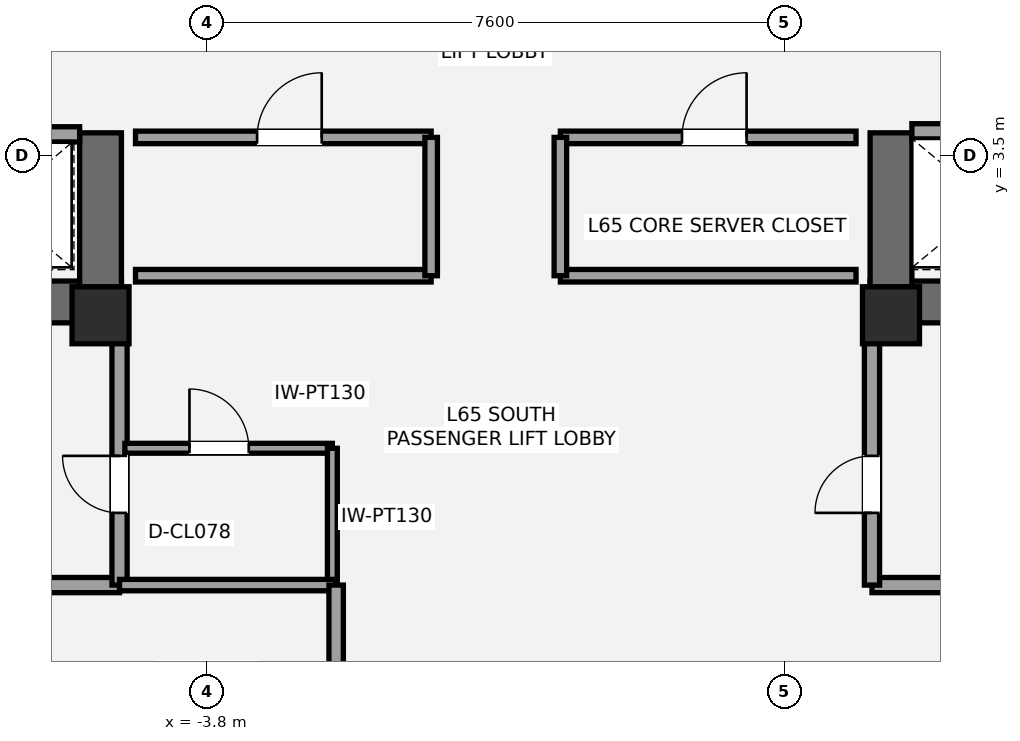
"""IFC4 building model, lengths in metres.
Left out: names, types, materials, properties, quantities, classifications, styles, units other than length and angle.
Written with IfcOpenShell. Run it as: python <this file> out.ifc"""

import sys

from ifc_helpers import new_model, si_unit, direction, frame, frame_2d, origin, origin_2d, place, context, subcontext, project, spatial, rectangle, extrude, element, fill, save


model = new_model("IFC4")
c1 = context("Model", 3, precision=1e-05, world=origin(), true_north=direction((0.0, 1.0)))
c2 = subcontext(c1, "Body", "Model", "MODEL_VIEW")
j1 = project(units=[si_unit("LENGTHUNIT", "METRE"), si_unit("PLANEANGLEUNIT", "RADIAN")], contexts=[c1])
p1 = place(None, origin())
s1 = spatial("IfcSite", under=j1, at=p1, CompositionType="ELEMENT")
p2 = place(p1, origin())
s2 = spatial("IfcBuilding", under=s1, at=p2, CompositionType="ELEMENT")
p3 = place(p2, frame((0.0, 0.0, 232.05)))
s3 = spatial("IfcBuildingStorey", under=s2, at=p3, CompositionType="ELEMENT", Elevation=232.05)
p4 = place(p3, frame((-4.925, 1.575, 0.0), z_axis=(0.0, 0.0, 1.0), x_axis=(-1.0, 0.0, 0.0)))
e1 = element("IfcWall", 1, at=p4, inside=s3, PredefinedType="SHEAR", context=c2, shape_type="SweptSolid", body=[
    extrude(rectangle(XDim=8.775, YDim=0.55, at=frame_2d((4.387, 0.0))), origin(), (0.0, 0.0, 1.0), 3.15),
])
p5 = place(p4, frame((5.375, 0.0, 0.0)))
e2 = element("IfcOpeningElement", 2, at=p5, cuts=e1, PredefinedType="OPENING", context=c2, shape_type="SweptSolid", body=[
    extrude(rectangle(XDim=1.05, YDim=2.15, at=frame_2d((0.525, 1.075))), frame((0.0, 0.285, 0.0), z_axis=(0.0, -1.0, 0.0), x_axis=(1.0, 0.0, 0.0)), (0.0, 0.0, 1.0), 0.57),
])
p6 = place(p4, frame((3.705, 0.0, 0.0)))
e3 = element("IfcOpeningElement", 3, at=p6, cuts=e1, PredefinedType="OPENING", context=c2, shape_type="SweptSolid", body=[
    extrude(rectangle(XDim=1.1, YDim=2.2, at=frame_2d((0.55, 1.1))), frame((0.0, 0.285, 0.0), z_axis=(0.0, -1.0, 0.0), x_axis=(1.0, 0.0, 0.0)), (0.0, 0.0, 1.0), 0.57),
])
p7 = place(p3, frame((-5.2, 1.3, 0.0), z_axis=(0.0, 0.0, 1.0), x_axis=(0.0, 1.0, 0.0)))
e4 = element("IfcWall", 4, at=p7, inside=s3, PredefinedType="SHEAR", context=c2, shape_type="SweptSolid", body=[
    extrude(rectangle(XDim=2.5, YDim=0.55, at=frame_2d((1.25, 0.0))), origin(), (0.0, 0.0, 1.0), 3.15),
])
p8 = place(p3, frame((13.7, 1.575, 0.0), z_axis=(0.0, 0.0, 1.0), x_axis=(-1.0, 0.0, 0.0)))
e5 = element("IfcWall", 5, at=p8, inside=s3, PredefinedType="SHEAR", context=c2, shape_type="SweptSolid", body=[
    extrude(rectangle(XDim=8.775, YDim=0.55, at=frame_2d((4.387, 0.0))), origin(), (0.0, 0.0, 1.0), 3.15),
])
p9 = place(p8, frame((2.35, 0.0, 0.0)))
e6 = element("IfcOpeningElement", 6, at=p9, cuts=e5, PredefinedType="OPENING", context=c2, shape_type="SweptSolid", body=[
    extrude(rectangle(XDim=1.05, YDim=2.15, at=frame_2d((0.525, 1.075))), frame((0.0, 0.285, 0.0), z_axis=(0.0, -1.0, 0.0), x_axis=(1.0, 0.0, 0.0)), (0.0, 0.0, 1.0), 0.57),
])
p10 = place(p8, frame((4.35, 0.0, 0.0)))
e7 = element("IfcOpeningElement", 7, at=p10, cuts=e5, PredefinedType="OPENING", context=c2, shape_type="SweptSolid", body=[
    extrude(rectangle(XDim=1.1, YDim=2.2, at=frame_2d((0.55, 1.1))), frame((0.0, 0.285, 0.0), z_axis=(0.0, -1.0, 0.0), x_axis=(1.0, 0.0, 0.0)), (0.0, 0.0, 1.0), 0.57),
])
p11 = place(p3, frame((5.2, 1.3, 0.0), z_axis=(0.0, 0.0, 1.0), x_axis=(0.0, 1.0, 0.0)))
e8 = element("IfcWall", 8, at=p11, inside=s3, PredefinedType="SHEAR", context=c2, shape_type="SweptSolid", body=[
    extrude(rectangle(XDim=2.5, YDim=0.55, at=frame_2d((1.25, 0.0))), origin(), (0.0, 0.0, 1.0), 3.15),
])
for number, where, z_axis, x_axis in (
    (9, (-5.2, 1.4, 0.0), (0.0, 0.0, 1.0), (1.0, 0.0, 0.0)),
    (10, (5.2, 1.4, 0.0), (0.0, 0.0, 1.0), (1.0, 0.0, 0.0)),
):
    element("IfcColumn", number, at=place(p3, frame(where, z_axis=z_axis, x_axis=x_axis)), inside=s3, PredefinedType="PILASTER", context=c2, shape_type="SweptSolid", body=[
        extrude(rectangle(XDim=0.75, YDim=0.75, at=origin_2d()), origin(), (0.0, 0.0, 1.0), 3.15),
    ])
p12 = place(p3, frame((-7.2, -2.15, 0.0), z_axis=(0.0, 0.0, 1.0), x_axis=(1.0, 0.0, 0.0)))
e11 = element("IfcWall", 11, at=p12, inside=s3, PredefinedType="SOLIDWALL", context=c2, shape_type="SweptSolid", body=[
    extrude(rectangle(XDim=2.25, YDim=0.2, at=frame_2d((1.125, 0.0))), origin(), (0.0, 0.0, 1.0), 2.97),
])
p13 = place(p3, frame((-4.95, -2.15, 0.0), z_axis=(0.0, 0.0, 1.0), x_axis=(0.0, 1.0, 0.0)))
e12 = element("IfcWall", 12, at=p13, inside=s3, PredefinedType="SOLIDWALL", context=c2, shape_type="SweptSolid", body=[
    extrude(rectangle(XDim=3.5, YDim=0.2, at=frame_2d((1.75, 0.0))), origin(), (0.0, 0.0, 1.0), 2.423),
])
p14 = place(p13, frame((0.95, 0.0, 0.0)))
e13 = element("IfcOpeningElement", 13, at=p14, cuts=e12, PredefinedType="OPENING", context=c2, shape_type="SweptSolid", body=[
    extrude(rectangle(XDim=0.75, YDim=2.1, at=frame_2d((0.375, 1.05))), frame((0.0, 0.11, 0.0), z_axis=(0.0, -1.0, 0.0), x_axis=(1.0, 0.0, 0.0)), (0.0, 0.0, 1.0), 0.22),
])
p15 = place(p3, frame((4.95, -2.15, 0.0), z_axis=(0.0, 0.0, 1.0), x_axis=(1.0, 0.0, 0.0)))
e14 = element("IfcWall", 14, at=p15, inside=s3, PredefinedType="SOLIDWALL", context=c2, shape_type="SweptSolid", body=[
    extrude(rectangle(XDim=2.25, YDim=0.2, at=frame_2d((1.125, 0.0))), origin(), (0.0, 0.0, 1.0), 2.97),
])
p16 = place(p3, frame((4.95, -2.15, 0.0), z_axis=(0.0, 0.0, 1.0), x_axis=(0.0, 1.0, 0.0)))
e15 = element("IfcWall", 15, at=p16, inside=s3, PredefinedType="SOLIDWALL", context=c2, shape_type="SweptSolid", body=[
    extrude(rectangle(XDim=3.5, YDim=0.2, at=frame_2d((1.75, 0.0))), origin(), (0.0, 0.0, 1.0), 2.423),
])
p17 = place(p16, frame((0.95, 0.0, 0.0)))
e16 = element("IfcOpeningElement", 16, at=p17, cuts=e15, PredefinedType="OPENING", context=c2, shape_type="SweptSolid", body=[
    extrude(rectangle(XDim=0.75, YDim=2.1, at=frame_2d((0.375, 1.05))), frame((0.0, 0.11, 0.0), z_axis=(0.0, -1.0, 0.0), x_axis=(1.0, 0.0, 0.0)), (0.0, 0.0, 1.0), 0.22),
])
p18 = place(p3, frame((-4.88, -0.35, 0.0), z_axis=(0.0, 0.0, 1.0), x_axis=(1.0, 0.0, 0.0)))
e17 = element("IfcWall", 17, at=p18, inside=s3, PredefinedType="PARTITIONING", context=c2, shape_type="SweptSolid", body=[
    extrude(rectangle(XDim=2.73, YDim=0.13, at=frame_2d((1.365, 0.0))), origin(), (0.0, 0.0, 1.0), 2.97),
])
p19 = place(p18, frame((0.85, 0.0, 0.0)))
e18 = element("IfcOpeningElement", 18, at=p19, cuts=e17, PredefinedType="OPENING", context=c2, shape_type="SweptSolid", body=[
    extrude(rectangle(XDim=0.78, YDim=2.1, at=frame_2d((0.39, 1.05))), frame((0.0, 0.075, 0.0), z_axis=(0.0, -1.0, 0.0), x_axis=(1.0, 0.0, 0.0)), (0.0, 0.0, 1.0), 0.15),
])
p20 = place(p3, frame((-2.15, -2.15, 0.0), z_axis=(0.0, 0.0, 1.0), x_axis=(0.0, 1.0, 0.0)))
e19 = element("IfcWall", 19, at=p20, inside=s3, PredefinedType="PARTITIONING", context=c2, shape_type="SweptSolid", body=[
    extrude(rectangle(XDim=1.8, YDim=0.13, at=frame_2d((0.9, 0.0))), origin(), (0.0, 0.0, 1.0), 2.97),
])
p21 = place(p3, frame((-9.78, 3.78, 0.0), z_axis=(0.0, 0.0, 1.0), x_axis=(1.0, 0.0, 0.0)))
e20 = element("IfcWall", 20, at=p21, inside=s3, PredefinedType="SOLIDWALL", context=c2, shape_type="SweptSolid", body=[
    extrude(rectangle(XDim=4.305, YDim=0.2, at=frame_2d((2.152, 0.0))), origin(), (0.0, 0.0, 1.0), 2.97),
])
p22 = place(p21, frame((2.72, 0.0, 0.0)))
e21 = element("IfcOpeningElement", 21, at=p22, cuts=e20, PredefinedType="OPENING", context=c2, shape_type="SweptSolid", body=[
    extrude(rectangle(XDim=1.1, YDim=2.2, at=frame_2d((0.55, 1.1))), frame((0.0, 0.11, 0.0), z_axis=(0.0, -1.0, 0.0), x_axis=(1.0, 0.0, 0.0)), (0.0, 0.0, 1.0), 0.22),
])
p23 = place(p3, frame((5.475, 3.82, 0.0), z_axis=(0.0, 0.0, 1.0), x_axis=(1.0, 0.0, 0.0)))
e22 = element("IfcWall", 22, at=p23, inside=s3, PredefinedType="SOLIDWALL", context=c2, shape_type="SweptSolid", body=[
    extrude(rectangle(XDim=4.305, YDim=0.2, at=frame_2d((2.152, 0.0))), origin(), (0.0, 0.0, 1.0), 2.97),
])
p24 = place(p23, frame((0.65, 0.0, 0.0)))
e23 = element("IfcOpeningElement", 23, at=p24, cuts=e22, PredefinedType="OPENING", context=c2, shape_type="SweptSolid", body=[
    extrude(rectangle(XDim=1.2, YDim=2.2, at=frame_2d((0.6, 1.1))), frame((0.0, 0.11, 0.0), z_axis=(0.0, -1.0, 0.0), x_axis=(1.0, 0.0, 0.0)), (0.0, 0.0, 1.0), 0.22),
])
p25 = place(p3, frame((-4.74, 1.92, 0.0), z_axis=(0.0, 0.0, 1.0), x_axis=(1.0, 0.0, 0.0)))
e24 = element("IfcWall", 24, at=p25, inside=s3, PredefinedType="PARTITIONING", context=c2, shape_type="SweptSolid", body=[
    extrude(rectangle(XDim=3.89, YDim=0.165, at=frame_2d((1.945, 0.0))), origin(), (0.0, 0.0, 1.0), 2.11),
])
p26 = place(p3, frame((-4.74, 3.74, 0.0), z_axis=(0.0, 0.0, 1.0), x_axis=(1.0, 0.0, 0.0)))
e25 = element("IfcWall", 25, at=p26, inside=s3, PredefinedType="PARTITIONING", context=c2, shape_type="SweptSolid", body=[
    extrude(rectangle(XDim=3.89, YDim=0.165, at=frame_2d((1.945, 0.0))), origin(), (0.0, 0.0, 1.0), 2.97),
])
p27 = place(p26, frame((1.6, 0.0, 0.0)))
e26 = element("IfcOpeningElement", 26, at=p27, cuts=e25, PredefinedType="OPENING", context=c2, shape_type="SweptSolid", body=[
    extrude(rectangle(XDim=0.85, YDim=2.1, at=frame_2d((0.425, 1.05))), frame((0.0, 0.093, 0.0), z_axis=(0.0, -1.0, 0.0), x_axis=(1.0, 0.0, 0.0)), (0.0, 0.0, 1.0), 0.185),
])
p28 = place(p3, frame((-0.85, 1.92, 0.0), z_axis=(0.0, 0.0, 1.0), x_axis=(0.0, 1.0, 0.0)))
e27 = element("IfcWall", 27, at=p28, inside=s3, PredefinedType="PARTITIONING", context=c2, shape_type="SweptSolid", body=[
    extrude(rectangle(XDim=1.82, YDim=0.165, at=frame_2d((0.91, 0.0))), origin(), (0.0, 0.0, 1.0), 2.97),
])
p29 = place(p3, frame((0.85, 1.92, 0.0), z_axis=(0.0, 0.0, 1.0), x_axis=(1.0, 0.0, 0.0)))
e28 = element("IfcWall", 28, at=p29, inside=s3, PredefinedType="PARTITIONING", context=c2, shape_type="SweptSolid", body=[
    extrude(rectangle(XDim=3.89, YDim=0.165, at=frame_2d((1.945, 0.0))), origin(), (0.0, 0.0, 1.0), 2.11),
])
p30 = place(p3, frame((0.85, 3.74, 0.0), z_axis=(0.0, 0.0, 1.0), x_axis=(1.0, 0.0, 0.0)))
e29 = element("IfcWall", 29, at=p30, inside=s3, PredefinedType="PARTITIONING", context=c2, shape_type="SweptSolid", body=[
    extrude(rectangle(XDim=3.89, YDim=0.165, at=frame_2d((1.945, 0.0))), origin(), (0.0, 0.0, 1.0), 2.97),
])
p31 = place(p30, frame((1.6, 0.0, 0.0)))
e30 = element("IfcOpeningElement", 30, at=p31, cuts=e29, PredefinedType="OPENING", context=c2, shape_type="SweptSolid", body=[
    extrude(rectangle(XDim=0.85, YDim=2.1, at=frame_2d((0.425, 1.05))), frame((0.0, 0.093, 0.0), z_axis=(0.0, -1.0, 0.0), x_axis=(1.0, 0.0, 0.0)), (0.0, 0.0, 1.0), 0.185),
])
p32 = place(p3, frame((0.85, 1.92, 0.0), z_axis=(0.0, 0.0, 1.0), x_axis=(0.0, 1.0, 0.0)))
e31 = element("IfcWall", 31, at=p32, inside=s3, PredefinedType="PARTITIONING", context=c2, shape_type="SweptSolid", body=[
    extrude(rectangle(XDim=1.82, YDim=0.165, at=frame_2d((0.91, 0.0))), origin(), (0.0, 0.0, 1.0), 2.97),
])
p33 = place(p3, frame((-4.95, -2.15, 0.0), z_axis=(0.0, 0.0, 1.0), x_axis=(1.0, 0.0, 0.0)))
e32 = element("IfcWall", 32, at=p33, inside=s3, PredefinedType="PLUMBINGWALL", context=c2, shape_type="SweptSolid", body=[
    extrude(rectangle(XDim=2.85, YDim=0.15, at=frame_2d((1.425, 0.0))), origin(), (0.0, 0.0, 1.0), 2.97),
])
p34 = place(p3, frame((-2.1, -4.05, 0.0), z_axis=(0.0, 0.0, 1.0), x_axis=(0.0, 1.0, 0.0)))
e33 = element("IfcWall", 33, at=p34, inside=s3, PredefinedType="PLUMBINGWALL", context=c2, shape_type="SweptSolid", body=[
    extrude(rectangle(XDim=1.9, YDim=0.19, at=frame_2d((0.95, 0.0))), origin(), (0.0, 0.0, 1.0), 2.423),
])
p35 = place(p14, origin())
e34 = element("IfcDoor", 34, at=p35, inside=s3, OperationType="SINGLE_SWING_RIGHT", PredefinedType="DOOR", context=c2, shape_type="SweptSolid", body=[
    extrude(rectangle(XDim=0.75, YDim=2.1, at=frame_2d((0.375, 1.05))), frame((0.0, 0.025, 0.0), z_axis=(0.0, -1.0, 0.0), x_axis=(1.0, 0.0, 0.0)), (0.0, 0.0, 1.0), 0.05),
])
fill(e13, e34)
p36 = place(p17, origin())
e35 = element("IfcDoor", 35, at=p36, inside=s3, OperationType="SINGLE_SWING_LEFT", PredefinedType="DOOR", context=c2, shape_type="SweptSolid", body=[
    extrude(rectangle(XDim=0.75, YDim=2.1, at=frame_2d((0.375, 1.05))), frame((0.0, 0.025, 0.0), z_axis=(0.0, -1.0, 0.0), x_axis=(1.0, 0.0, 0.0)), (0.0, 0.0, 1.0), 0.05),
])
fill(e16, e35)
p37 = place(p19, origin())
e36 = element("IfcDoor", 36, at=p37, inside=s3, OperationType="SINGLE_SWING_LEFT", PredefinedType="DOOR", context=c2, shape_type="SweptSolid", body=[
    extrude(rectangle(XDim=0.78, YDim=2.1, at=frame_2d((0.39, 1.05))), frame((0.0, 0.025, 0.0), z_axis=(0.0, -1.0, 0.0), x_axis=(1.0, 0.0, 0.0)), (0.0, 0.0, 1.0), 0.05),
])
fill(e18, e36)
p38 = place(p27, origin())
e37 = element("IfcDoor", 37, at=p38, inside=s3, OperationType="SINGLE_SWING_RIGHT", PredefinedType="DOOR", context=c2, shape_type="SweptSolid", body=[
    extrude(rectangle(XDim=0.85, YDim=2.1, at=frame_2d((0.425, 1.05))), frame((0.0, 0.025, 0.0), z_axis=(0.0, -1.0, 0.0), x_axis=(1.0, 0.0, 0.0)), (0.0, 0.0, 1.0), 0.05),
])
fill(e26, e37)
p39 = place(p31, origin())
e38 = element("IfcDoor", 38, at=p39, inside=s3, OperationType="SINGLE_SWING_RIGHT", PredefinedType="DOOR", context=c2, shape_type="SweptSolid", body=[
    extrude(rectangle(XDim=0.85, YDim=2.1, at=frame_2d((0.425, 1.05))), frame((0.0, 0.025, 0.0), z_axis=(0.0, -1.0, 0.0), x_axis=(1.0, 0.0, 0.0)), (0.0, 0.0, 1.0), 0.05),
])
fill(e30, e38)
save(model, sys.argv[1])
